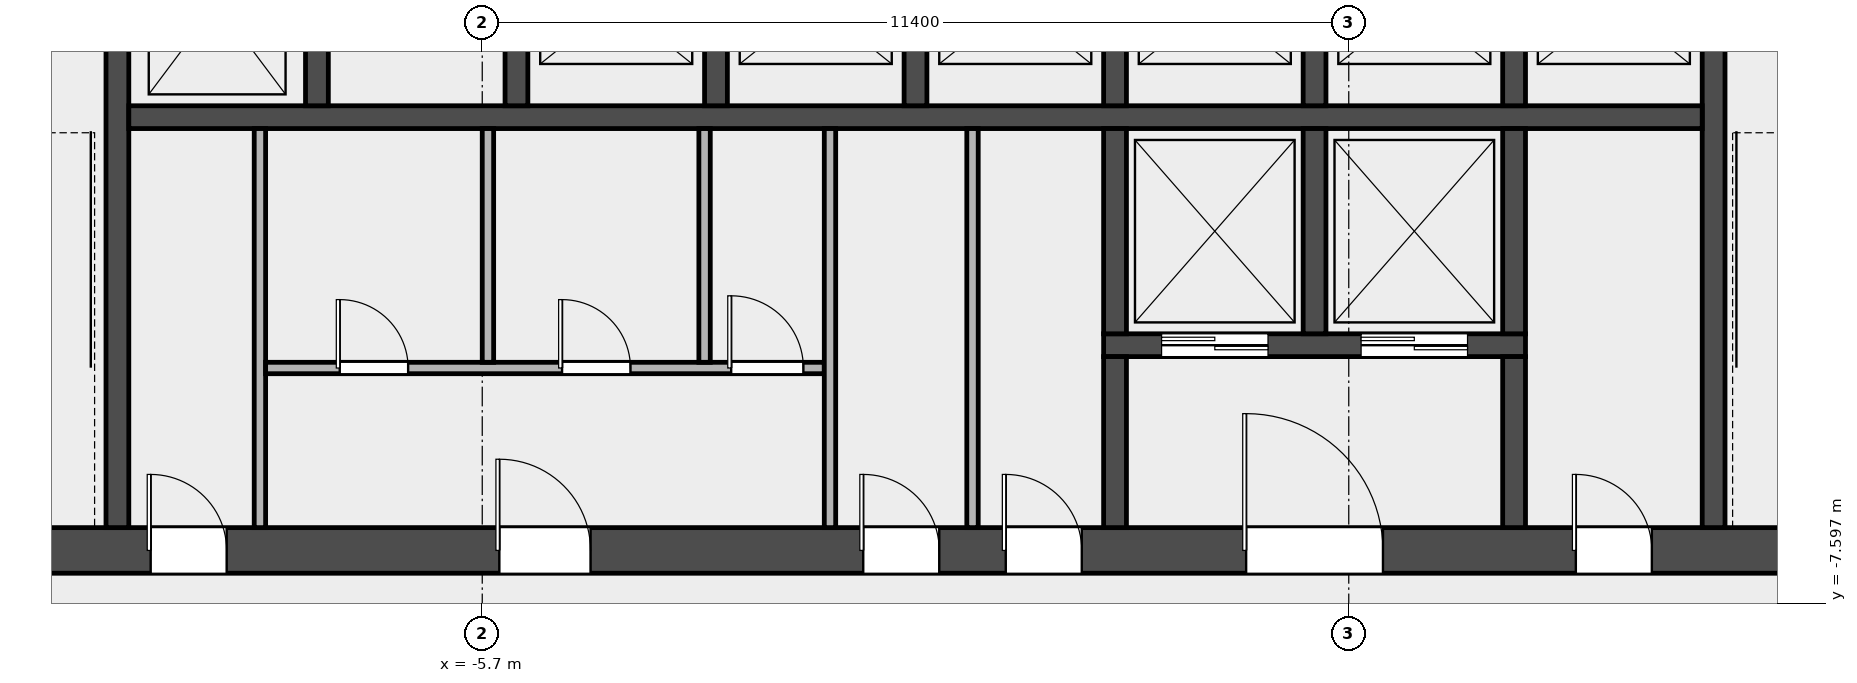
"""IFC4 building model, lengths in metres.
Left out: names, types, materials, properties, quantities, classifications, styles, units other than length and angle.
Written with IfcOpenShell. Run it as: python <this file> out.ifc"""

import sys

from ifc_helpers import new_model, si_unit, direction, frame, frame_2d, origin, place, context, subcontext, project, spatial, rectangle, extrude, element, fill, save


model = new_model("IFC4")
c1 = context("Model", 3, precision=1e-05, world=origin(), true_north=direction((0.0, 1.0)))
c2 = subcontext(c1, "Body", "Model", "MODEL_VIEW")
j1 = project(units=[si_unit("LENGTHUNIT", "METRE"), si_unit("PLANEANGLEUNIT", "RADIAN")], contexts=[c1])
p1 = place(None, origin())
s1 = spatial("IfcSite", under=j1, at=p1, CompositionType="ELEMENT")
p2 = place(p1, origin())
s2 = spatial("IfcBuilding", under=s1, at=p2, CompositionType="ELEMENT")
p3 = place(p2, frame((0.0, 0.0, 165.0)))
s3 = spatial("IfcBuildingStorey", under=s2, at=p3, CompositionType="ELEMENT", Elevation=165.0)
p4 = place(p3, frame((-14.4, -6.9, 0.0), z_axis=(0.0, 0.0, 1.0), x_axis=(1.0, 0.0, 0.0)))
e1 = element("IfcWall", 1, at=p4, inside=s3, PredefinedType="SHEAR", context=c2, shape_type="SweptSolid", body=[
    extrude(rectangle(XDim=28.8, YDim=0.6, at=frame_2d((14.4, 0.0))), origin(), (0.0, 0.0, 1.0), 3.7),
])
p5 = place(p4, frame((4.337, 0.0, 0.0)))
e2 = element("IfcOpeningElement", 2, at=p5, cuts=e1, PredefinedType="OPENING", context=c2, shape_type="SweptSolid", body=[
    extrude(rectangle(XDim=1.0, YDim=2.1, at=frame_2d((0.5, 1.05))), frame((0.0, 0.312, 0.0), z_axis=(0.0, -1.0, 0.0), x_axis=(1.0, 0.0, 0.0)), (0.0, 0.0, 1.0), 0.624),
])
p6 = place(p4, frame((8.925, 0.0, 0.0)))
e3 = element("IfcOpeningElement", 3, at=p6, cuts=e1, PredefinedType="OPENING", context=c2, shape_type="SweptSolid", body=[
    extrude(rectangle(XDim=1.2, YDim=2.1, at=frame_2d((0.6, 1.05))), frame((0.0, 0.312, 0.0), z_axis=(0.0, -1.0, 0.0), x_axis=(1.0, 0.0, 0.0)), (0.0, 0.0, 1.0), 0.624),
])
p7 = place(p4, frame((13.712, 0.0, 0.0)))
e4 = element("IfcOpeningElement", 4, at=p7, cuts=e1, PredefinedType="OPENING", context=c2, shape_type="SweptSolid", body=[
    extrude(rectangle(XDim=1.0, YDim=2.1, at=frame_2d((0.5, 1.05))), frame((0.0, 0.312, 0.0), z_axis=(0.0, -1.0, 0.0), x_axis=(1.0, 0.0, 0.0)), (0.0, 0.0, 1.0), 0.624),
])
p8 = place(p4, frame((15.587, 0.0, 0.0)))
e5 = element("IfcOpeningElement", 5, at=p8, cuts=e1, PredefinedType="OPENING", context=c2, shape_type="SweptSolid", body=[
    extrude(rectangle(XDim=1.0, YDim=2.1, at=frame_2d((0.5, 1.05))), frame((0.0, 0.312, 0.0), z_axis=(0.0, -1.0, 0.0), x_axis=(1.0, 0.0, 0.0)), (0.0, 0.0, 1.0), 0.624),
])
p9 = place(p4, frame((18.75, 0.0, 0.0)))
e6 = element("IfcOpeningElement", 6, at=p9, cuts=e1, PredefinedType="OPENING", context=c2, shape_type="SweptSolid", body=[
    extrude(rectangle(XDim=1.8, YDim=2.1, at=frame_2d((0.9, 1.05))), frame((0.0, 0.312, 0.0), z_axis=(0.0, -1.0, 0.0), x_axis=(1.0, 0.0, 0.0)), (0.0, 0.0, 1.0), 0.624),
])
p10 = place(p4, frame((23.087, 0.0, 0.0)))
e7 = element("IfcOpeningElement", 7, at=p10, cuts=e1, PredefinedType="OPENING", context=c2, shape_type="SweptSolid", body=[
    extrude(rectangle(XDim=1.0, YDim=2.1, at=frame_2d((0.5, 1.05))), frame((0.0, 0.312, 0.0), z_axis=(0.0, -1.0, 0.0), x_axis=(1.0, 0.0, 0.0)), (0.0, 0.0, 1.0), 0.624),
])
for number, where, z_axis, x_axis in (
    (8, (-10.5, -6.6, 0.0), (0.0, 0.0, 1.0), (0.0, 1.0, 0.0)),
    (9, (10.5, -6.6, 0.0), (0.0, 0.0, 1.0), (0.0, 1.0, 0.0)),
):
    element("IfcWall", number, at=place(p3, frame(where, z_axis=z_axis, x_axis=x_axis)), inside=s3, PredefinedType="SHEAR", context=c2, shape_type="SweptSolid", body=[
        extrude(rectangle(XDim=8.55, YDim=0.3, at=frame_2d((4.275, 0.0))), origin(), (0.0, 0.0, 1.0), 3.7),
    ])
p11 = place(p3, frame((-10.35, -1.2, 0.0), z_axis=(0.0, 0.0, 1.0), x_axis=(1.0, 0.0, 0.0)))
e10 = element("IfcWall", 10, at=p11, inside=s3, PredefinedType="SOLIDWALL", context=c2, shape_type="SweptSolid", body=[
    extrude(rectangle(XDim=20.7, YDim=0.3, at=frame_2d((10.35, 0.0))), origin(), (0.0, 0.0, 1.0), 3.7),
])
for number, where, z_axis, x_axis in (
    (11, (-7.875, -1.05, 0.0), (0.0, 0.0, 1.0), (0.0, 1.0, 0.0)),
    (12, (-5.25, -1.05, 0.0), (0.0, 0.0, 1.0), (0.0, 1.0, 0.0)),
    (13, (-2.625, -1.05, 0.0), (0.0, 0.0, 1.0), (0.0, 1.0, 0.0)),
    (14, (0.0, -1.05, 0.0), (0.0, 0.0, 1.0), (0.0, 1.0, 0.0)),
    (15, (2.625, -1.05, 0.0), (0.0, 0.0, 1.0), (0.0, 1.0, 0.0)),
    (16, (5.25, -1.05, 0.0), (0.0, 0.0, 1.0), (0.0, 1.0, 0.0)),
    (17, (7.875, -1.05, 0.0), (0.0, 0.0, 1.0), (0.0, 1.0, 0.0)),
):
    element("IfcWall", number, at=place(p3, frame(where, z_axis=z_axis, x_axis=x_axis)), inside=s3, PredefinedType="SOLIDWALL", context=c2, shape_type="SweptSolid", body=[
        extrude(rectangle(XDim=2.7, YDim=0.3, at=frame_2d((1.35, 0.0))), origin(), (0.0, 0.0, 1.0), 3.7),
    ])
p12 = place(p3, frame((2.475, -4.2, 0.0), z_axis=(0.0, 0.0, 1.0), x_axis=(1.0, 0.0, 0.0)))
e18 = element("IfcWall", 18, at=p12, inside=s3, PredefinedType="SOLIDWALL", context=c2, shape_type="SweptSolid", body=[
    extrude(rectangle(XDim=5.55, YDim=0.3, at=frame_2d((2.775, 0.0))), origin(), (0.0, 0.0, 1.0), 3.7),
])
p13 = place(p12, frame((0.762, 0.0, 0.0)))
e19 = element("IfcOpeningElement", 19, at=p13, cuts=e18, PredefinedType="OPENING", context=c2, shape_type="SweptSolid", body=[
    extrude(rectangle(XDim=1.4, YDim=2.1, at=frame_2d((0.7, 1.05))), frame((0.0, 0.162, 0.0), z_axis=(0.0, -1.0, 0.0), x_axis=(1.0, 0.0, 0.0)), (0.0, 0.0, 1.0), 0.324),
])
p14 = place(p12, frame((3.387, 0.0, 0.0)))
e20 = element("IfcOpeningElement", 20, at=p14, cuts=e18, PredefinedType="OPENING", context=c2, shape_type="SweptSolid", body=[
    extrude(rectangle(XDim=1.4, YDim=2.1, at=frame_2d((0.7, 1.05))), frame((0.0, 0.162, 0.0), z_axis=(0.0, -1.0, 0.0), x_axis=(1.0, 0.0, 0.0)), (0.0, 0.0, 1.0), 0.324),
])
p15 = place(p3, frame((2.625, -4.05, 0.0), z_axis=(0.0, 0.0, 1.0), x_axis=(0.0, 1.0, 0.0)))
e21 = element("IfcWall", 21, at=p15, inside=s3, PredefinedType="SOLIDWALL", context=c2, shape_type="SweptSolid", body=[
    extrude(rectangle(XDim=2.7, YDim=0.3, at=frame_2d((1.35, 0.0))), origin(), (0.0, 0.0, 1.0), 3.7),
])
p16 = place(p3, frame((2.625, -6.6, 0.0), z_axis=(0.0, 0.0, 1.0), x_axis=(0.0, 1.0, 0.0)))
e22 = element("IfcWall", 22, at=p16, inside=s3, PredefinedType="SOLIDWALL", context=c2, shape_type="SweptSolid", body=[
    extrude(rectangle(XDim=2.25, YDim=0.3, at=frame_2d((1.125, 0.0))), origin(), (0.0, 0.0, 1.0), 3.7),
])
for number, where, z_axis, x_axis in (
    (23, (5.25, -4.05, 0.0), (0.0, 0.0, 1.0), (0.0, 1.0, 0.0)),
    (24, (7.875, -4.05, 0.0), (0.0, 0.0, 1.0), (0.0, 1.0, 0.0)),
):
    element("IfcWall", number, at=place(p3, frame(where, z_axis=z_axis, x_axis=x_axis)), inside=s3, PredefinedType="SOLIDWALL", context=c2, shape_type="SweptSolid", body=[
        extrude(rectangle(XDim=2.7, YDim=0.3, at=frame_2d((1.35, 0.0))), origin(), (0.0, 0.0, 1.0), 3.7),
    ])
p17 = place(p3, frame((7.875, -6.6, 0.0), z_axis=(0.0, 0.0, 1.0), x_axis=(0.0, 1.0, 0.0)))
e25 = element("IfcWall", 25, at=p17, inside=s3, PredefinedType="SOLIDWALL", context=c2, shape_type="SweptSolid", body=[
    extrude(rectangle(XDim=2.25, YDim=0.3, at=frame_2d((1.125, 0.0))), origin(), (0.0, 0.0, 1.0), 3.7),
])
p18 = place(p3, frame((-8.625, -6.6, 0.0), z_axis=(0.0, 0.0, 1.0), x_axis=(0.0, 1.0, 0.0)))
e26 = element("IfcWall", 26, at=p18, inside=s3, PredefinedType="PARTITIONING", context=c2, shape_type="SweptSolid", body=[
    extrude(rectangle(XDim=5.25, YDim=0.15, at=frame_2d((2.625, 0.0))), origin(), (0.0, 0.0, 1.0), 3.7),
])
p19 = place(p3, frame((-8.55, -4.5, 0.0), z_axis=(0.0, 0.0, 1.0), x_axis=(1.0, 0.0, 0.0)))
e27 = element("IfcWall", 27, at=p19, inside=s3, PredefinedType="PARTITIONING", context=c2, shape_type="SweptSolid", body=[
    extrude(rectangle(XDim=7.35, YDim=0.15, at=frame_2d((3.675, 0.0))), origin(), (0.0, 0.0, 1.0), 3.7),
])
p20 = place(p19, frame((0.975, 0.0, 0.0)))
e28 = element("IfcOpeningElement", 28, at=p20, cuts=e27, PredefinedType="OPENING", context=c2, shape_type="SweptSolid", body=[
    extrude(rectangle(XDim=0.9, YDim=2.1, at=frame_2d((0.45, 1.05))), frame((0.0, 0.087, 0.0), z_axis=(0.0, -1.0, 0.0), x_axis=(1.0, 0.0, 0.0)), (0.0, 0.0, 1.0), 0.174),
])
p21 = place(p19, frame((3.9, 0.0, 0.0)))
e29 = element("IfcOpeningElement", 29, at=p21, cuts=e27, PredefinedType="OPENING", context=c2, shape_type="SweptSolid", body=[
    extrude(rectangle(XDim=0.9, YDim=2.1, at=frame_2d((0.45, 1.05))), frame((0.0, 0.087, 0.0), z_axis=(0.0, -1.0, 0.0), x_axis=(1.0, 0.0, 0.0)), (0.0, 0.0, 1.0), 0.174),
])
p22 = place(p19, frame((6.125, 0.0, 0.0)))
e30 = element("IfcOpeningElement", 30, at=p22, cuts=e27, PredefinedType="OPENING", context=c2, shape_type="SweptSolid", body=[
    extrude(rectangle(XDim=0.95, YDim=2.1, at=frame_2d((0.475, 1.05))), frame((0.0, 0.087, 0.0), z_axis=(0.0, -1.0, 0.0), x_axis=(1.0, 0.0, 0.0)), (0.0, 0.0, 1.0), 0.174),
])
for number, where, z_axis, x_axis in (
    (31, (-5.625, -4.425, 0.0), (0.0, 0.0, 1.0), (0.0, 1.0, 0.0)),
    (32, (-2.775, -4.425, 0.0), (0.0, 0.0, 1.0), (0.0, 1.0, 0.0)),
):
    element("IfcWall", number, at=place(p3, frame(where, z_axis=z_axis, x_axis=x_axis)), inside=s3, PredefinedType="PARTITIONING", context=c2, shape_type="SweptSolid", body=[
        extrude(rectangle(XDim=3.075, YDim=0.15, at=frame_2d((1.538, 0.0))), origin(), (0.0, 0.0, 1.0), 3.7),
    ])
for number, where, z_axis, x_axis in (
    (33, (-1.125, -6.6, 0.0), (0.0, 0.0, 1.0), (0.0, 1.0, 0.0)),
    (34, (0.75, -6.6, 0.0), (0.0, 0.0, 1.0), (0.0, 1.0, 0.0)),
):
    element("IfcWall", number, at=place(p3, frame(where, z_axis=z_axis, x_axis=x_axis)), inside=s3, PredefinedType="PARTITIONING", context=c2, shape_type="SweptSolid", body=[
        extrude(rectangle(XDim=5.25, YDim=0.15, at=frame_2d((2.625, 0.0))), origin(), (0.0, 0.0, 1.0), 3.7),
    ])
p23 = place(p13, origin())
e35 = element("IfcDoor", 35, at=p23, inside=s3, OperationType="DOUBLE_DOOR_SLIDING", PredefinedType="DOOR", context=c2, shape_type="SweptSolid", body=[
    extrude(rectangle(XDim=1.4, YDim=2.1, at=frame_2d((0.7, 1.05))), frame((0.0, 0.025, 0.0), z_axis=(0.0, -1.0, 0.0), x_axis=(1.0, 0.0, 0.0)), (0.0, 0.0, 1.0), 0.05),
])
fill(e19, e35)
p24 = place(p14, origin())
e36 = element("IfcDoor", 36, at=p24, inside=s3, OperationType="DOUBLE_DOOR_SLIDING", PredefinedType="DOOR", context=c2, shape_type="SweptSolid", body=[
    extrude(rectangle(XDim=1.4, YDim=2.1, at=frame_2d((0.7, 1.05))), frame((0.0, 0.025, 0.0), z_axis=(0.0, -1.0, 0.0), x_axis=(1.0, 0.0, 0.0)), (0.0, 0.0, 1.0), 0.05),
])
fill(e20, e36)
p25 = place(p5, origin())
e37 = element("IfcDoor", 37, at=p25, inside=s3, OperationType="SINGLE_SWING_LEFT", PredefinedType="DOOR", context=c2, shape_type="SweptSolid", body=[
    extrude(rectangle(XDim=1.0, YDim=2.1, at=frame_2d((0.5, 1.05))), frame((0.0, 0.025, 0.0), z_axis=(0.0, -1.0, 0.0), x_axis=(1.0, 0.0, 0.0)), (0.0, 0.0, 1.0), 0.05),
])
fill(e2, e37)
p26 = place(p6, origin())
e38 = element("IfcDoor", 38, at=p26, inside=s3, OperationType="SINGLE_SWING_LEFT", PredefinedType="DOOR", context=c2, shape_type="SweptSolid", body=[
    extrude(rectangle(XDim=1.2, YDim=2.1, at=frame_2d((0.6, 1.05))), frame((0.0, 0.025, 0.0), z_axis=(0.0, -1.0, 0.0), x_axis=(1.0, 0.0, 0.0)), (0.0, 0.0, 1.0), 0.05),
])
fill(e3, e38)
p27 = place(p20, origin())
e39 = element("IfcDoor", 39, at=p27, inside=s3, OperationType="SINGLE_SWING_LEFT", PredefinedType="DOOR", context=c2, shape_type="SweptSolid", body=[
    extrude(rectangle(XDim=0.9, YDim=2.1, at=frame_2d((0.45, 1.05))), frame((0.0, 0.025, 0.0), z_axis=(0.0, -1.0, 0.0), x_axis=(1.0, 0.0, 0.0)), (0.0, 0.0, 1.0), 0.05),
])
fill(e28, e39)
p28 = place(p21, origin())
e40 = element("IfcDoor", 40, at=p28, inside=s3, OperationType="SINGLE_SWING_LEFT", PredefinedType="DOOR", context=c2, shape_type="SweptSolid", body=[
    extrude(rectangle(XDim=0.9, YDim=2.1, at=frame_2d((0.45, 1.05))), frame((0.0, 0.025, 0.0), z_axis=(0.0, -1.0, 0.0), x_axis=(1.0, 0.0, 0.0)), (0.0, 0.0, 1.0), 0.05),
])
fill(e29, e40)
p29 = place(p22, origin())
e41 = element("IfcDoor", 41, at=p29, inside=s3, OperationType="SINGLE_SWING_LEFT", PredefinedType="DOOR", context=c2, shape_type="SweptSolid", body=[
    extrude(rectangle(XDim=0.95, YDim=2.1, at=frame_2d((0.475, 1.05))), frame((0.0, 0.025, 0.0), z_axis=(0.0, -1.0, 0.0), x_axis=(1.0, 0.0, 0.0)), (0.0, 0.0, 1.0), 0.05),
])
fill(e30, e41)
p30 = place(p7, origin())
e42 = element("IfcDoor", 42, at=p30, inside=s3, OperationType="SINGLE_SWING_LEFT", PredefinedType="DOOR", context=c2, shape_type="SweptSolid", body=[
    extrude(rectangle(XDim=1.0, YDim=2.1, at=frame_2d((0.5, 1.05))), frame((0.0, 0.025, 0.0), z_axis=(0.0, -1.0, 0.0), x_axis=(1.0, 0.0, 0.0)), (0.0, 0.0, 1.0), 0.05),
])
fill(e4, e42)
p31 = place(p8, origin())
e43 = element("IfcDoor", 43, at=p31, inside=s3, OperationType="SINGLE_SWING_LEFT", PredefinedType="DOOR", context=c2, shape_type="SweptSolid", body=[
    extrude(rectangle(XDim=1.0, YDim=2.1, at=frame_2d((0.5, 1.05))), frame((0.0, 0.025, 0.0), z_axis=(0.0, -1.0, 0.0), x_axis=(1.0, 0.0, 0.0)), (0.0, 0.0, 1.0), 0.05),
])
fill(e5, e43)
p32 = place(p9, origin())
e44 = element("IfcDoor", 44, at=p32, inside=s3, OperationType="DOUBLE_DOOR_SINGLE_SWING", PredefinedType="DOOR", context=c2, shape_type="SweptSolid", body=[
    extrude(rectangle(XDim=1.8, YDim=2.1, at=frame_2d((0.9, 1.05))), frame((0.0, 0.025, 0.0), z_axis=(0.0, -1.0, 0.0), x_axis=(1.0, 0.0, 0.0)), (0.0, 0.0, 1.0), 0.05),
])
fill(e6, e44)
p33 = place(p10, origin())
e45 = element("IfcDoor", 45, at=p33, inside=s3, OperationType="SINGLE_SWING_LEFT", PredefinedType="DOOR", context=c2, shape_type="SweptSolid", body=[
    extrude(rectangle(XDim=1.0, YDim=2.1, at=frame_2d((0.5, 1.05))), frame((0.0, 0.025, 0.0), z_axis=(0.0, -1.0, 0.0), x_axis=(1.0, 0.0, 0.0)), (0.0, 0.0, 1.0), 0.05),
])
fill(e7, e45)
save(model, sys.argv[1])
